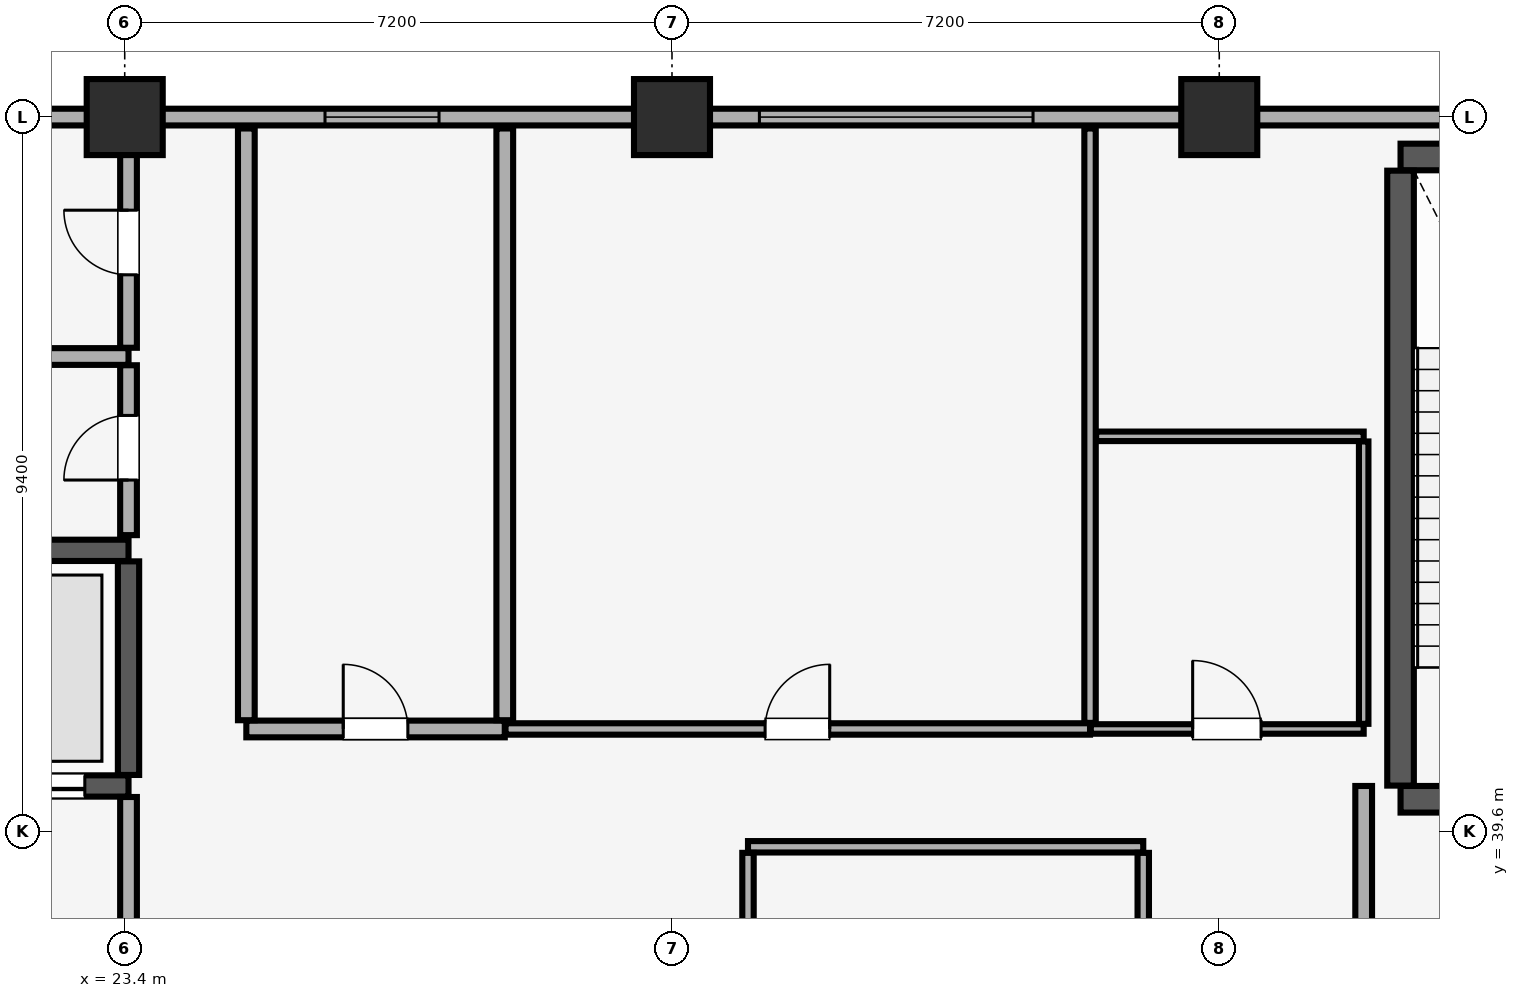
"""IFC4 building model, lengths in metres.
Left out: names, types, materials, properties, quantities, classifications, styles, units other than length and angle.
Written with IfcOpenShell. Run it as: python <this file> out.ifc"""

import sys

from ifc_helpers import new_model, si_unit, direction, frame, frame_2d, origin, origin_2d, place, context, subcontext, project, spatial, rectangle, extrude, element, fill, save


model = new_model("IFC4")
c1 = context("Model", 3, precision=1e-05, world=origin(), true_north=direction((0.0, 1.0)))
c2 = subcontext(c1, "Body", "Model", "MODEL_VIEW")
j1 = project(units=[si_unit("LENGTHUNIT", "METRE"), si_unit("PLANEANGLEUNIT", "RADIAN")], contexts=[c1])
p1 = place(None, origin())
s1 = spatial("IfcSite", under=j1, at=p1, CompositionType="ELEMENT")
p2 = place(p1, origin())
s2 = spatial("IfcBuilding", under=s1, at=p2, CompositionType="ELEMENT")
p3 = place(p2, frame((0.0, 0.0, 294.7)))
s3 = spatial("IfcBuildingStorey", under=s2, at=p3, CompositionType="ELEMENT", Elevation=294.7)
for number, where, z_axis, x_axis in (
    (1, (23.4, 49.0, 0.0), (0.0, 0.0, 1.0), (1.0, 0.0, 0.0)),
    (2, (30.6, 49.0, 0.0), (0.0, 0.0, 1.0), (1.0, 0.0, 0.0)),
    (3, (37.8, 49.0, 0.0), (0.0, 0.0, 1.0), (1.0, 0.0, 0.0)),
):
    element("IfcColumn", number, at=place(p3, frame(where, z_axis=z_axis, x_axis=x_axis)), inside=s3, PredefinedType="COLUMN", context=c2, shape_type="SweptSolid", body=[
        extrude(rectangle(XDim=1.0, YDim=1.0, at=origin_2d()), origin(), (0.0, 0.0, 1.0), 5.12),
    ])
p4 = place(p3, frame((71.4, 49.0, 0.0), z_axis=(0.0, 0.0, 1.0), x_axis=(-1.0, 0.0, 0.0)))
e4 = element("IfcWall", 4, at=p4, inside=s3, PredefinedType="SOLIDWALL", context=c2, shape_type="SweptSolid", body=[
    extrude(rectangle(XDim=58.8, YDim=0.22, at=frame_2d((29.4, 0.0))), origin(), (0.0, 0.0, 1.0), 4.32),
])
p5 = place(p4, frame((56.365, 0.0, 0.85)))
e5 = element("IfcOpeningElement", 5, at=p5, cuts=e4, PredefinedType="OPENING", context=c2, shape_type="SweptSolid", body=[
    extrude(rectangle(XDim=1.5, YDim=1.4, at=frame_2d((0.75, 0.7))), frame((0.0, 0.12, 0.0), z_axis=(0.0, -1.0, 0.0), x_axis=(1.0, 0.0, 0.0)), (0.0, 0.0, 1.0), 0.24),
])
p6 = place(p4, frame((0.935, 0.0, 0.85)))
e6 = element("IfcOpeningElement", 6, at=p6, cuts=e4, PredefinedType="OPENING", context=c2, shape_type="SweptSolid", body=[
    extrude(rectangle(XDim=1.5, YDim=1.4, at=frame_2d((0.75, 0.7))), frame((0.0, 0.12, 0.0), z_axis=(0.0, -1.0, 0.0), x_axis=(1.0, 0.0, 0.0)), (0.0, 0.0, 1.0), 0.24),
])
p7 = place(p4, frame((43.865, 0.0, 0.9)))
e7 = element("IfcOpeningElement", 7, at=p7, cuts=e4, PredefinedType="OPENING", context=c2, shape_type="SweptSolid", body=[
    extrude(rectangle(XDim=1.5, YDim=1.4, at=frame_2d((0.75, 0.7))), frame((0.0, 0.12, 0.0), z_axis=(0.0, -1.0, 0.0), x_axis=(1.0, 0.0, 0.0)), (0.0, 0.0, 1.0), 0.24),
])
p8 = place(p4, frame((36.05, 0.0, 0.9)))
e8 = element("IfcOpeningElement", 8, at=p8, cuts=e4, PredefinedType="OPENING", context=c2, shape_type="SweptSolid", body=[
    extrude(rectangle(XDim=3.6, YDim=1.5, at=frame_2d((1.8, 0.75))), frame((0.0, 0.12, 0.0), z_axis=(0.0, -1.0, 0.0), x_axis=(1.0, 0.0, 0.0)), (0.0, 0.0, 1.0), 0.24),
])
p9 = place(p4, frame((22.65, 0.0, 0.9)))
e9 = element("IfcOpeningElement", 9, at=p9, cuts=e4, PredefinedType="OPENING", context=c2, shape_type="SweptSolid", body=[
    extrude(rectangle(XDim=1.5, YDim=1.4, at=frame_2d((0.75, 0.7))), frame((0.0, 0.12, 0.0), z_axis=(0.0, -1.0, 0.0), x_axis=(1.0, 0.0, 0.0)), (0.0, 0.0, 1.0), 0.24),
])
p10 = place(p4, frame((19.0, 0.0, 0.9)))
e10 = element("IfcOpeningElement", 10, at=p10, cuts=e4, PredefinedType="OPENING", context=c2, shape_type="SweptSolid", body=[
    extrude(rectangle(XDim=2.4, YDim=1.5, at=frame_2d((1.2, 0.75))), frame((0.0, 0.12, 0.0), z_axis=(0.0, -1.0, 0.0), x_axis=(1.0, 0.0, 0.0)), (0.0, 0.0, 1.0), 0.24),
])
p11 = place(p4, frame((14.635, 0.0, 0.9)))
e11 = element("IfcOpeningElement", 11, at=p11, cuts=e4, PredefinedType="OPENING", context=c2, shape_type="SweptSolid", body=[
    extrude(rectangle(XDim=2.4, YDim=1.5, at=frame_2d((1.2, 0.75))), frame((0.0, 0.12, 0.0), z_axis=(0.0, -1.0, 0.0), x_axis=(1.0, 0.0, 0.0)), (0.0, 0.0, 1.0), 0.24),
])
p12 = place(p3, frame((40.185, 40.025, 0.0), z_axis=(0.0, 0.0, 1.0), x_axis=(1.0, 0.0, 0.0)))
e12 = element("IfcWall", 12, at=p12, inside=s3, PredefinedType="SHEAR", context=c2, shape_type="SweptSolid", body=[
    extrude(rectangle(XDim=3.63, YDim=0.35, at=frame_2d((1.815, 0.0))), origin(), (0.0, 0.0, 1.0), 5.12),
])
p13 = place(p12, frame((1.24, 0.0, 0.0)))
e13 = element("IfcOpeningElement", 13, at=p13, cuts=e12, PredefinedType="OPENING", context=c2, shape_type="SweptSolid", body=[
    extrude(rectangle(XDim=1.15, YDim=2.15, at=frame_2d((0.575, 1.075))), frame((0.0, 0.185, 0.0), z_axis=(0.0, -1.0, 0.0), x_axis=(1.0, 0.0, 0.0)), (0.0, 0.0, 1.0), 0.37),
])
p14 = place(p3, frame((40.185, 48.475, 0.0), z_axis=(0.0, 0.0, 1.0), x_axis=(1.0, 0.0, 0.0)))
e14 = element("IfcWall", 14, at=p14, inside=s3, PredefinedType="SHEAR", context=c2, shape_type="SweptSolid", body=[
    extrude(rectangle(XDim=3.63, YDim=0.35, at=frame_2d((1.815, 0.0))), origin(), (0.0, 0.0, 1.0), 5.12),
])
p15 = place(p3, frame((40.185, 40.205, 0.0), z_axis=(0.0, 0.0, 1.0), x_axis=(0.0, 1.0, 0.0)))
e15 = element("IfcWall", 15, at=p15, inside=s3, PredefinedType="SHEAR", context=c2, shape_type="SweptSolid", body=[
    extrude(rectangle(XDim=8.09, YDim=0.35, at=frame_2d((4.045, 0.0))), origin(), (0.0, 0.0, 1.0), 5.12),
])
p16 = place(p3, frame((21.035, 40.2, 0.0), z_axis=(0.0, 0.0, 1.0), x_axis=(1.0, 0.0, 0.0)))
e16 = element("IfcWall", 16, at=p16, inside=s3, PredefinedType="SHEAR", context=c2, shape_type="SweptSolid", body=[
    extrude(rectangle(XDim=2.415, YDim=0.28, at=frame_2d((1.208, 0.0))), origin(), (0.0, 0.0, 1.0), 5.12),
])
p17 = place(p16, frame((0.54, 0.0, 0.0)))
e17 = element("IfcOpeningElement", 17, at=p17, cuts=e16, PredefinedType="OPENING", context=c2, shape_type="SweptSolid", body=[
    extrude(rectangle(XDim=1.3, YDim=2.3, at=frame_2d((0.65, 1.15))), frame((0.0, 0.15, 0.0), z_axis=(0.0, -1.0, 0.0), x_axis=(1.0, 0.0, 0.0)), (0.0, 0.0, 1.0), 0.3),
])
p18 = place(p3, frame((21.035, 43.3, 0.0), z_axis=(0.0, 0.0, 1.0), x_axis=(1.0, 0.0, 0.0)))
e18 = element("IfcWall", 18, at=p18, inside=s3, PredefinedType="SHEAR", context=c2, shape_type="SweptSolid", body=[
    extrude(rectangle(XDim=2.415, YDim=0.28, at=frame_2d((1.208, 0.0))), origin(), (0.0, 0.0, 1.0), 5.12),
])
p19 = place(p3, frame((23.45, 40.345, 0.0), z_axis=(0.0, 0.0, 1.0), x_axis=(0.0, 1.0, 0.0)))
e19 = element("IfcWall", 19, at=p19, inside=s3, PredefinedType="SHEAR", context=c2, shape_type="SweptSolid", body=[
    extrude(rectangle(XDim=2.81, YDim=0.28, at=frame_2d((1.405, 0.0))), origin(), (0.0, 0.0, 1.0), 5.12),
])
p20 = place(p3, frame((23.45, 34.415, 0.0), z_axis=(0.0, 0.0, 1.0), x_axis=(0.0, 1.0, 0.0)))
e20 = element("IfcWall", 20, at=p20, inside=s3, PredefinedType="PARTITIONING", context=c2, shape_type="SweptSolid", body=[
    extrude(rectangle(XDim=5.64, YDim=0.22, at=frame_2d((2.82, 0.0))), origin(), (0.0, 0.0, 1.0), 5.12),
])
p21 = place(p3, frame((39.7, 34.415, 0.0), z_axis=(0.0, 0.0, 1.0), x_axis=(0.0, 1.0, 0.0)))
e21 = element("IfcWall", 21, at=p21, inside=s3, PredefinedType="PARTITIONING", context=c2, shape_type="SweptSolid", body=[
    extrude(rectangle(XDim=5.785, YDim=0.22, at=frame_2d((2.893, 0.0))), origin(), (0.0, 0.0, 1.0), 5.12),
])
p22 = place(p3, frame((21.035, 45.85, 0.0), z_axis=(0.0, 0.0, 1.0), x_axis=(1.0, 0.0, 0.0)))
e22 = element("IfcWall", 22, at=p22, inside=s3, PredefinedType="PARTITIONING", context=c2, shape_type="SweptSolid", body=[
    extrude(rectangle(XDim=2.415, YDim=0.22, at=frame_2d((1.208, 0.0))), origin(), (0.0, 0.0, 1.0), 5.12),
])
p23 = place(p3, frame((23.45, 43.5, 0.0), z_axis=(0.0, 0.0, 1.0), x_axis=(0.0, 1.0, 0.0)))
e23 = element("IfcWall", 23, at=p23, inside=s3, PredefinedType="PARTITIONING", context=c2, shape_type="SweptSolid", body=[
    extrude(rectangle(XDim=2.235, YDim=0.22, at=frame_2d((1.118, 0.0))), origin(), (0.0, 0.0, 1.0), 5.12),
])
p24 = place(p23, frame((0.725, 0.0, 0.0)))
e24 = element("IfcOpeningElement", 24, at=p24, cuts=e23, PredefinedType="OPENING", context=c2, shape_type="SweptSolid", body=[
    extrude(rectangle(XDim=0.85, YDim=2.1, at=frame_2d((0.425, 1.05))), frame((0.0, 0.12, 0.0), z_axis=(0.0, -1.0, 0.0), x_axis=(1.0, 0.0, 0.0)), (0.0, 0.0, 1.0), 0.24),
])
p25 = place(p3, frame((23.45, 45.965, 0.0), z_axis=(0.0, 0.0, 1.0), x_axis=(0.0, 1.0, 0.0)))
e25 = element("IfcWall", 25, at=p25, inside=s3, PredefinedType="PARTITIONING", context=c2, shape_type="SweptSolid", body=[
    extrude(rectangle(XDim=2.885, YDim=0.22, at=frame_2d((1.442, 0.0))), origin(), (0.0, 0.0, 1.0), 5.12),
])
p26 = place(p25, frame((0.96, 0.0, 0.0)))
e26 = element("IfcOpeningElement", 26, at=p26, cuts=e25, PredefinedType="OPENING", context=c2, shape_type="SweptSolid", body=[
    extrude(rectangle(XDim=0.85, YDim=2.1, at=frame_2d((0.425, 1.05))), frame((0.0, 0.12, 0.0), z_axis=(0.0, -1.0, 0.0), x_axis=(1.0, 0.0, 0.0)), (0.0, 0.0, 1.0), 0.24),
])
p27 = place(p3, frame((31.6, 39.4, 0.0), z_axis=(0.0, 0.0, 1.0), x_axis=(1.0, 0.0, 0.0)))
e27 = element("IfcWall", 27, at=p27, inside=s3, PredefinedType="PARTITIONING", context=c2, shape_type="SweptSolid", body=[
    extrude(rectangle(XDim=5.2, YDim=0.15, at=frame_2d((2.6, 0.0))), origin(), (0.0, 0.0, 1.0), 5.12),
])
for number, where, z_axis, x_axis in (
    (28, (31.6, 34.38, 0.0), (0.0, 0.0, 1.0), (0.0, 1.0, 0.0)),
    (29, (36.8, 34.38, 0.0), (0.0, 0.0, 1.0), (0.0, 1.0, 0.0)),
):
    element("IfcWall", number, at=place(p3, frame(where, z_axis=z_axis, x_axis=x_axis)), inside=s3, PredefinedType="PARTITIONING", context=c2, shape_type="SweptSolid", body=[
        extrude(rectangle(XDim=4.94, YDim=0.15, at=frame_2d((2.47, 0.0))), origin(), (0.0, 0.0, 1.0), 5.12),
    ])
p28 = place(p3, frame((25.0, 40.95, 0.0), z_axis=(0.0, 0.0, 1.0), x_axis=(1.0, 0.0, 0.0)))
e30 = element("IfcWall", 30, at=p28, inside=s3, PredefinedType="PARTITIONING", context=c2, shape_type="SweptSolid", body=[
    extrude(rectangle(XDim=3.4, YDim=0.22, at=frame_2d((1.7, 0.0))), origin(), (0.0, 0.0, 1.0), 5.12),
])
p29 = place(p28, frame((1.275, 0.0, 0.0)))
e31 = element("IfcOpeningElement", 31, at=p29, cuts=e30, PredefinedType="OPENING", context=c2, shape_type="SweptSolid", body=[
    extrude(rectangle(XDim=0.85, YDim=2.1, at=frame_2d((0.425, 1.05))), frame((0.0, 0.12, 0.0), z_axis=(0.0, -1.0, 0.0), x_axis=(1.0, 0.0, 0.0)), (0.0, 0.0, 1.0), 0.24),
])
for number, where, z_axis, x_axis in (
    (32, (25.0, 41.065, 0.0), (0.0, 0.0, 1.0), (0.0, 1.0, 0.0)),
    (33, (28.4, 41.065, 0.0), (0.0, 0.0, 1.0), (0.0, 1.0, 0.0)),
):
    element("IfcWall", number, at=place(p3, frame(where, z_axis=z_axis, x_axis=x_axis)), inside=s3, PredefinedType="PARTITIONING", context=c2, shape_type="SweptSolid", body=[
        extrude(rectangle(XDim=7.785, YDim=0.22, at=frame_2d((3.893, 0.0))), origin(), (0.0, 0.0, 1.0), 5.12),
    ])
p30 = place(p3, frame((28.41, 40.95, 0.0), z_axis=(0.0, 0.0, 1.0), x_axis=(1.0, 0.0, 0.0)))
e34 = element("IfcWall", 34, at=p30, inside=s3, PredefinedType="PARTITIONING", context=c2, shape_type="SweptSolid", body=[
    extrude(rectangle(XDim=7.69, YDim=0.15, at=frame_2d((3.845, 0.0))), origin(), (0.0, 0.0, 1.0), 5.12),
])
p31 = place(p30, frame((3.415, 0.0, 0.0)))
e35 = element("IfcOpeningElement", 35, at=p31, cuts=e34, PredefinedType="OPENING", context=c2, shape_type="SweptSolid", body=[
    extrude(rectangle(XDim=0.85, YDim=2.1, at=frame_2d((0.425, 1.05))), frame((0.0, 0.085, 0.0), z_axis=(0.0, -1.0, 0.0), x_axis=(1.0, 0.0, 0.0)), (0.0, 0.0, 1.0), 0.17),
])
p32 = place(p3, frame((36.1, 41.03, 0.0), z_axis=(0.0, 0.0, 1.0), x_axis=(0.0, 1.0, 0.0)))
e36 = element("IfcWall", 36, at=p32, inside=s3, PredefinedType="PARTITIONING", context=c2, shape_type="SweptSolid", body=[
    extrude(rectangle(XDim=7.82, YDim=0.15, at=frame_2d((3.91, 0.0))), origin(), (0.0, 0.0, 1.0), 5.12),
])
p33 = place(p3, frame((36.11, 40.95, 0.0), z_axis=(0.0, 0.0, 1.0), x_axis=(1.0, 0.0, 0.0)))
e37 = element("IfcWall", 37, at=p33, inside=s3, PredefinedType="PARTITIONING", context=c2, shape_type="SweptSolid", body=[
    extrude(rectangle(XDim=3.59, YDim=0.125, at=frame_2d((1.795, 0.0))), origin(), (0.0, 0.0, 1.0), 5.12),
])
p34 = place(p33, frame((1.34, 0.0, 0.0)))
e38 = element("IfcOpeningElement", 38, at=p34, cuts=e37, PredefinedType="OPENING", context=c2, shape_type="SweptSolid", body=[
    extrude(rectangle(XDim=0.9, YDim=2.1, at=frame_2d((0.45, 1.05))), frame((0.0, 0.073, 0.0), z_axis=(0.0, -1.0, 0.0), x_axis=(1.0, 0.0, 0.0)), (0.0, 0.0, 1.0), 0.145),
])
p35 = place(p3, frame((36.18, 44.8, 0.0), z_axis=(0.0, 0.0, 1.0), x_axis=(1.0, 0.0, 0.0)))
e39 = element("IfcWall", 39, at=p35, inside=s3, PredefinedType="PARTITIONING", context=c2, shape_type="SweptSolid", body=[
    extrude(rectangle(XDim=3.52, YDim=0.125, at=frame_2d((1.76, 0.0))), origin(), (0.0, 0.0, 1.0), 5.12),
])
p36 = place(p3, frame((39.7, 41.018, 0.0), z_axis=(0.0, 0.0, 1.0), x_axis=(0.0, 1.0, 0.0)))
e40 = element("IfcWall", 40, at=p36, inside=s3, PredefinedType="PARTITIONING", context=c2, shape_type="SweptSolid", body=[
    extrude(rectangle(XDim=3.715, YDim=0.125, at=frame_2d((1.857, 0.0))), origin(), (0.0, 0.0, 1.0), 5.12),
])
p37 = place(p7, origin())
e41 = element("IfcWindow", 41, at=p37, inside=s3, PartitioningType="SINGLE_PANEL", PredefinedType="WINDOW", context=c2, shape_type="SweptSolid", body=[
    extrude(rectangle(XDim=1.5, YDim=1.4, at=frame_2d((0.75, 0.7))), frame((0.0, 0.03, 0.0), z_axis=(0.0, -1.0, 0.0), x_axis=(1.0, 0.0, 0.0)), (0.0, 0.0, 1.0), 0.06),
])
fill(e7, e41)
p38 = place(p8, origin())
e42 = element("IfcWindow", 42, at=p38, inside=s3, PartitioningType="SINGLE_PANEL", PredefinedType="WINDOW", context=c2, shape_type="SweptSolid", body=[
    extrude(rectangle(XDim=3.6, YDim=1.5, at=frame_2d((1.8, 0.75))), frame((0.0, 0.03, 0.0), z_axis=(0.0, -1.0, 0.0), x_axis=(1.0, 0.0, 0.0)), (0.0, 0.0, 1.0), 0.06),
])
fill(e8, e42)
p39 = place(p17, origin())
e43 = element("IfcDoor", 43, at=p39, inside=s3, OperationType="DOUBLE_DOOR_SLIDING", PredefinedType="DOOR", context=c2, shape_type="SweptSolid", body=[
    extrude(rectangle(XDim=1.3, YDim=2.3, at=frame_2d((0.65, 1.15))), frame((0.0, 0.025, 0.0), z_axis=(0.0, -1.0, 0.0), x_axis=(1.0, 0.0, 0.0)), (0.0, 0.0, 1.0), 0.05),
])
fill(e17, e43)
p40 = place(p24, origin())
e44 = element("IfcDoor", 44, at=p40, inside=s3, OperationType="SINGLE_SWING_LEFT", PredefinedType="DOOR", context=c2, shape_type="SweptSolid", body=[
    extrude(rectangle(XDim=0.85, YDim=2.1, at=frame_2d((0.425, 1.05))), frame((0.0, 0.025, 0.0), z_axis=(0.0, -1.0, 0.0), x_axis=(1.0, 0.0, 0.0)), (0.0, 0.0, 1.0), 0.05),
])
fill(e24, e44)
p41 = place(p26, origin())
e45 = element("IfcDoor", 45, at=p41, inside=s3, OperationType="SINGLE_SWING_RIGHT", PredefinedType="DOOR", context=c2, shape_type="SweptSolid", body=[
    extrude(rectangle(XDim=0.85, YDim=2.1, at=frame_2d((0.425, 1.05))), frame((0.0, 0.025, 0.0), z_axis=(0.0, -1.0, 0.0), x_axis=(1.0, 0.0, 0.0)), (0.0, 0.0, 1.0), 0.05),
])
fill(e26, e45)
p42 = place(p29, origin())
e46 = element("IfcDoor", 46, at=p42, inside=s3, OperationType="SINGLE_SWING_LEFT", PredefinedType="DOOR", context=c2, shape_type="SweptSolid", body=[
    extrude(rectangle(XDim=0.85, YDim=2.1, at=frame_2d((0.425, 1.05))), frame((0.0, 0.025, 0.0), z_axis=(0.0, -1.0, 0.0), x_axis=(1.0, 0.0, 0.0)), (0.0, 0.0, 1.0), 0.05),
])
fill(e31, e46)
p43 = place(p31, origin())
e47 = element("IfcDoor", 47, at=p43, inside=s3, OperationType="SINGLE_SWING_RIGHT", PredefinedType="DOOR", context=c2, shape_type="SweptSolid", body=[
    extrude(rectangle(XDim=0.85, YDim=2.1, at=frame_2d((0.425, 1.05))), frame((0.0, 0.025, 0.0), z_axis=(0.0, -1.0, 0.0), x_axis=(1.0, 0.0, 0.0)), (0.0, 0.0, 1.0), 0.05),
])
fill(e35, e47)
p44 = place(p34, origin())
e48 = element("IfcDoor", 48, at=p44, inside=s3, OperationType="SINGLE_SWING_LEFT", PredefinedType="DOOR", context=c2, shape_type="SweptSolid", body=[
    extrude(rectangle(XDim=0.9, YDim=2.1, at=frame_2d((0.45, 1.05))), frame((0.0, 0.025, 0.0), z_axis=(0.0, -1.0, 0.0), x_axis=(1.0, 0.0, 0.0)), (0.0, 0.0, 1.0), 0.05),
])
fill(e38, e48)
save(model, sys.argv[1])
